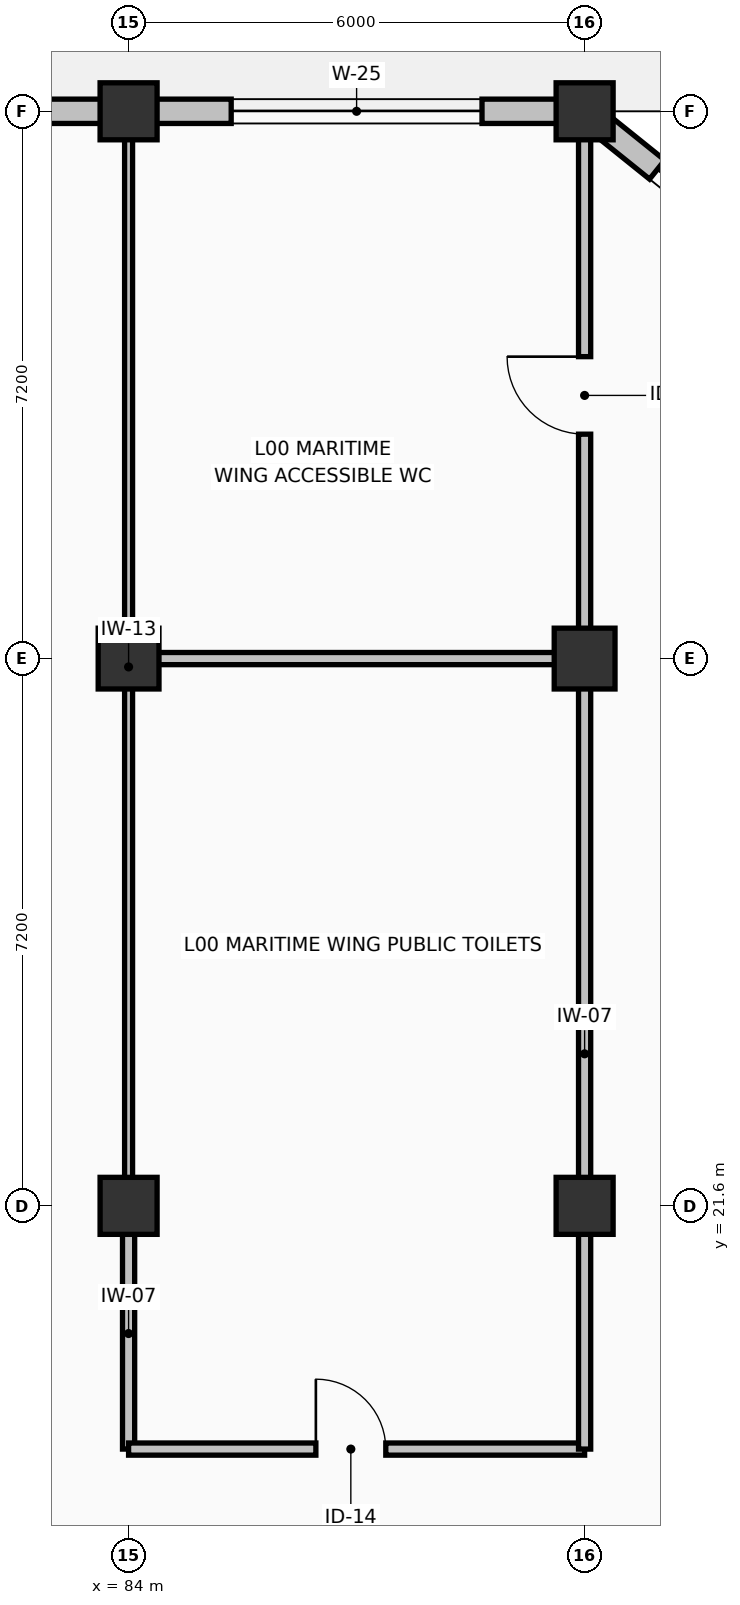
"""IFC4 building model, lengths in metres.
Left out: names, types, materials, properties, quantities, classifications, styles, units other than length and angle.
Written with IfcOpenShell. Run it as: python <this file> out.ifc"""

import sys

from ifc_helpers import new_model, si_unit, direction, frame, frame_2d, origin, origin_2d, place, context, subcontext, project, spatial, rectangle, extrude, element, fill, save


model = new_model("IFC4")
c1 = context("Model", 3, precision=1e-05, world=origin(), true_north=direction((0.0, 1.0)))
c2 = subcontext(c1, "Body", "Model", "MODEL_VIEW")
j1 = project(units=[si_unit("LENGTHUNIT", "METRE"), si_unit("PLANEANGLEUNIT", "RADIAN")], contexts=[c1])
p1 = place(None, origin())
s1 = spatial("IfcSite", under=j1, at=p1, CompositionType="ELEMENT")
p2 = place(p1, origin())
s2 = spatial("IfcBuilding", under=s1, at=p2, CompositionType="ELEMENT")
p3 = place(p2, origin())
s3 = spatial("IfcBuildingStorey", under=s2, at=p3, CompositionType="ELEMENT", Elevation=0.0)
p4 = place(p3, frame((84.0, 21.6, 0.0), z_axis=(0.0, 0.0, 1.0), x_axis=(1.0, 0.0, 0.0)))
e1 = element("IfcColumn", 1, at=p4, inside=s3, PredefinedType="COLUMN", context=c2, shape_type="SweptSolid", body=[
    extrude(rectangle(XDim=0.75, YDim=0.75, at=origin_2d()), origin(), (0.0, 0.0, 1.0), 5.76),
])
p5 = place(p3, frame((84.0, 28.8, 0.0), z_axis=(0.0, 0.0, 1.0), x_axis=(1.0, 0.0, 0.0)))
e2 = element("IfcColumn", 2, at=p5, inside=s3, PredefinedType="COLUMN", context=c2, shape_type="SweptSolid", body=[
    extrude(rectangle(XDim=0.8, YDim=0.8, at=origin_2d()), origin(), (0.0, 0.0, 1.0), 5.76),
])
for number, where, z_axis, x_axis in (
    (3, (84.0, 36.0, 0.0), (0.0, 0.0, 1.0), (1.0, 0.0, 0.0)),
    (4, (90.0, 21.6, 0.0), (0.0, 0.0, 1.0), (1.0, 0.0, 0.0)),
):
    element("IfcColumn", number, at=place(p3, frame(where, z_axis=z_axis, x_axis=x_axis)), inside=s3, PredefinedType="COLUMN", context=c2, shape_type="SweptSolid", body=[
        extrude(rectangle(XDim=0.75, YDim=0.75, at=origin_2d()), origin(), (0.0, 0.0, 1.0), 5.76),
    ])
p6 = place(p3, frame((90.0, 28.8, 0.0), z_axis=(0.0, 0.0, 1.0), x_axis=(1.0, 0.0, 0.0)))
e5 = element("IfcColumn", 5, at=p6, inside=s3, PredefinedType="COLUMN", context=c2, shape_type="SweptSolid", body=[
    extrude(rectangle(XDim=0.8, YDim=0.8, at=origin_2d()), origin(), (0.0, 0.0, 1.0), 5.76),
])
p7 = place(p3, frame((90.0, 36.0, 0.0), z_axis=(0.0, 0.0, 1.0), x_axis=(1.0, 0.0, 0.0)))
e6 = element("IfcColumn", 6, at=p7, inside=s3, PredefinedType="COLUMN", context=c2, shape_type="SweptSolid", body=[
    extrude(rectangle(XDim=0.75, YDim=0.75, at=origin_2d()), origin(), (0.0, 0.0, 1.0), 5.76),
])
p8 = place(p3, frame((93.0, 33.588, 0.0), z_axis=(0.0, 0.0, 1.0), x_axis=(-0.779393889884, 0.626534248395, 0.0)))
e7 = element("IfcWall", 7, at=p8, inside=s3, PredefinedType="SOLIDWALL", context=c2, shape_type="SweptSolid", body=[
    extrude(rectangle(XDim=3.849, YDim=0.32, at=frame_2d((1.925, 0.0))), origin(), (0.0, 0.0, 1.0), 5.46),
])
p9 = place(p8, frame((1.124, 0.0, 1.15)))
e8 = element("IfcOpeningElement", 8, at=p9, cuts=e7, PredefinedType="OPENING", context=c2, shape_type="SweptSolid", body=[
    extrude(rectangle(XDim=1.5, YDim=1.5, at=frame_2d((0.75, 0.75))), frame((0.0, 0.17, 0.0), z_axis=(0.0, -1.0, 0.0), x_axis=(1.0, 0.0, 0.0)), (0.0, 0.0, 1.0), 0.34),
])
p10 = place(p3, frame((90.0, 36.0, 0.0), z_axis=(0.0, 0.0, 1.0), x_axis=(-1.0, 0.0, 0.0)))
e9 = element("IfcWall", 9, at=p10, inside=s3, PredefinedType="SOLIDWALL", context=c2, shape_type="SweptSolid", body=[
    extrude(rectangle(XDim=6.0, YDim=0.32, at=frame_2d((3.0, 0.0))), origin(), (0.0, 0.0, 1.0), 4.79),
])
p11 = place(p10, frame((1.35, 0.0, 0.95)))
e10 = element("IfcOpeningElement", 10, at=p11, cuts=e9, PredefinedType="OPENING", context=c2, shape_type="SweptSolid", body=[
    extrude(rectangle(XDim=3.3, YDim=1.45, at=frame_2d((1.65, 0.725))), frame((0.0, 0.17, 0.0), z_axis=(0.0, -1.0, 0.0), x_axis=(1.0, 0.0, 0.0)), (0.0, 0.0, 1.0), 0.34),
])
p12 = place(p3, frame((84.0, 36.0, 0.0), z_axis=(0.0, 0.0, 1.0), x_axis=(-1.0, 0.0, 0.0)))
e11 = element("IfcWall", 11, at=p12, inside=s3, PredefinedType="SOLIDWALL", context=c2, shape_type="SweptSolid", body=[
    extrude(rectangle(XDim=6.0, YDim=0.32, at=frame_2d((3.0, 0.0))), origin(), (0.0, 0.0, 1.0), 4.69),
])
p13 = place(p12, frame((1.45, 0.0, 0.95)))
e12 = element("IfcOpeningElement", 12, at=p13, cuts=e11, PredefinedType="OPENING", context=c2, shape_type="SweptSolid", body=[
    extrude(rectangle(XDim=3.1, YDim=1.4, at=frame_2d((1.55, 0.7))), frame((0.0, 0.17, 0.0), z_axis=(0.0, -1.0, 0.0), x_axis=(1.0, 0.0, 0.0)), (0.0, 0.0, 1.0), 0.34),
])
p14 = place(p3, frame((84.0, 21.6, 0.0), z_axis=(0.0, 0.0, 1.0), x_axis=(0.0, 1.0, 0.0)))
e13 = element("IfcWall", 13, at=p14, inside=s3, PredefinedType="PARTITIONING", context=c2, shape_type="SweptSolid", body=[
    extrude(rectangle(XDim=14.18, YDim=0.105, at=frame_2d((7.09, 0.0))), origin(), (0.0, 0.0, 1.0), 4.54),
])
p15 = place(p3, frame((84.0, 21.44, 0.0), z_axis=(0.0, 0.0, 1.0), x_axis=(0.0, -1.0, 0.0)))
e14 = element("IfcWall", 14, at=p15, inside=s3, PredefinedType="PARTITIONING", context=c2, shape_type="SweptSolid", body=[
    extrude(rectangle(XDim=3.04, YDim=0.16, at=frame_2d((1.52, 0.0))), origin(), (0.0, 0.0, 1.0), 4.64),
])
p16 = place(p3, frame((84.0, 18.4, 0.0), z_axis=(0.0, 0.0, 1.0), x_axis=(1.0, 0.0, 0.0)))
e15 = element("IfcWall", 15, at=p16, inside=s3, PredefinedType="PARTITIONING", context=c2, shape_type="SweptSolid", body=[
    extrude(rectangle(XDim=6.0, YDim=0.16, at=frame_2d((3.0, 0.0))), origin(), (0.0, 0.0, 1.0), 5.2),
])
p17 = place(p16, frame((2.464, 0.0, 0.0)))
e16 = element("IfcOpeningElement", 16, at=p17, cuts=e15, PredefinedType="OPENING", context=c2, shape_type="SweptSolid", body=[
    extrude(rectangle(XDim=0.92, YDim=2.1, at=frame_2d((0.46, 1.05))), frame((0.0, 0.09, 0.0), z_axis=(0.0, -1.0, 0.0), x_axis=(1.0, 0.0, 0.0)), (0.0, 0.0, 1.0), 0.18),
])
p18 = place(p3, frame((90.0, 18.4, 0.0), z_axis=(0.0, 0.0, 1.0), x_axis=(0.0, 1.0, 0.0)))
e17 = element("IfcWall", 17, at=p18, inside=s3, PredefinedType="PARTITIONING", context=c2, shape_type="SweptSolid", body=[
    extrude(rectangle(XDim=10.4, YDim=0.16, at=frame_2d((5.2, 0.0))), origin(), (0.0, 0.0, 1.0), 4.54),
])
p19 = place(p3, frame((90.0, 28.8, 0.0), z_axis=(0.0, 0.0, 1.0), x_axis=(-1.0, 0.0, 0.0)))
e18 = element("IfcWall", 18, at=p19, inside=s3, PredefinedType="PARTITIONING", context=c2, shape_type="SweptSolid", body=[
    extrude(rectangle(XDim=5.84, YDim=0.16, at=frame_2d((2.92, 0.0))), origin(), (0.0, 0.0, 1.0), 4.89),
])
p20 = place(p3, frame((90.0, 28.96, 0.0), z_axis=(0.0, 0.0, 1.0), x_axis=(0.0, 1.0, 0.0)))
e19 = element("IfcWall", 19, at=p20, inside=s3, PredefinedType="PARTITIONING", context=c2, shape_type="SweptSolid", body=[
    extrude(rectangle(XDim=6.758, YDim=0.16, at=frame_2d((3.379, 0.0))), origin(), (0.0, 0.0, 1.0), 4.74),
])
p21 = place(p20, frame((2.792, 0.0, 0.0)))
e20 = element("IfcOpeningElement", 20, at=p21, cuts=e19, PredefinedType="OPENING", context=c2, shape_type="SweptSolid", body=[
    extrude(rectangle(XDim=1.02, YDim=2.1, at=frame_2d((0.51, 1.05))), frame((0.0, 0.09, 0.0), z_axis=(0.0, -1.0, 0.0), x_axis=(1.0, 0.0, 0.0)), (0.0, 0.0, 1.0), 0.18),
])
p22 = place(p9, origin())
e21 = element("IfcWindow", 21, at=p22, inside=s3, PartitioningType="SINGLE_PANEL", PredefinedType="WINDOW", context=c2, shape_type="SweptSolid", body=[
    extrude(rectangle(XDim=1.5, YDim=1.5, at=frame_2d((0.75, 0.75))), frame((0.0, 0.03, 0.0), z_axis=(0.0, -1.0, 0.0), x_axis=(1.0, 0.0, 0.0)), (0.0, 0.0, 1.0), 0.06),
])
fill(e8, e21)
p23 = place(p11, origin())
e22 = element("IfcWindow", 22, at=p23, inside=s3, PartitioningType="SINGLE_PANEL", PredefinedType="WINDOW", context=c2, shape_type="SweptSolid", body=[
    extrude(rectangle(XDim=3.3, YDim=1.45, at=frame_2d((1.65, 0.725))), frame((0.0, 0.03, 0.0), z_axis=(0.0, -1.0, 0.0), x_axis=(1.0, 0.0, 0.0)), (0.0, 0.0, 1.0), 0.06),
])
fill(e10, e22)
p24 = place(p17, origin())
e23 = element("IfcDoor", 23, at=p24, inside=s3, OperationType="SINGLE_SWING_LEFT", PredefinedType="DOOR", context=c2, shape_type="SweptSolid", body=[
    extrude(rectangle(XDim=0.92, YDim=2.1, at=frame_2d((0.46, 1.05))), frame((0.0, 0.025, 0.0), z_axis=(0.0, -1.0, 0.0), x_axis=(1.0, 0.0, 0.0)), (0.0, 0.0, 1.0), 0.05),
])
fill(e16, e23)
p25 = place(p21, origin())
e24 = element("IfcDoor", 24, at=p25, inside=s3, OperationType="SINGLE_SWING_RIGHT", PredefinedType="DOOR", context=c2, shape_type="SweptSolid", body=[
    extrude(rectangle(XDim=1.02, YDim=2.1, at=frame_2d((0.51, 1.05))), frame((0.0, 0.025, 0.0), z_axis=(0.0, -1.0, 0.0), x_axis=(1.0, 0.0, 0.0)), (0.0, 0.0, 1.0), 0.05),
])
fill(e20, e24)
save(model, sys.argv[1])
